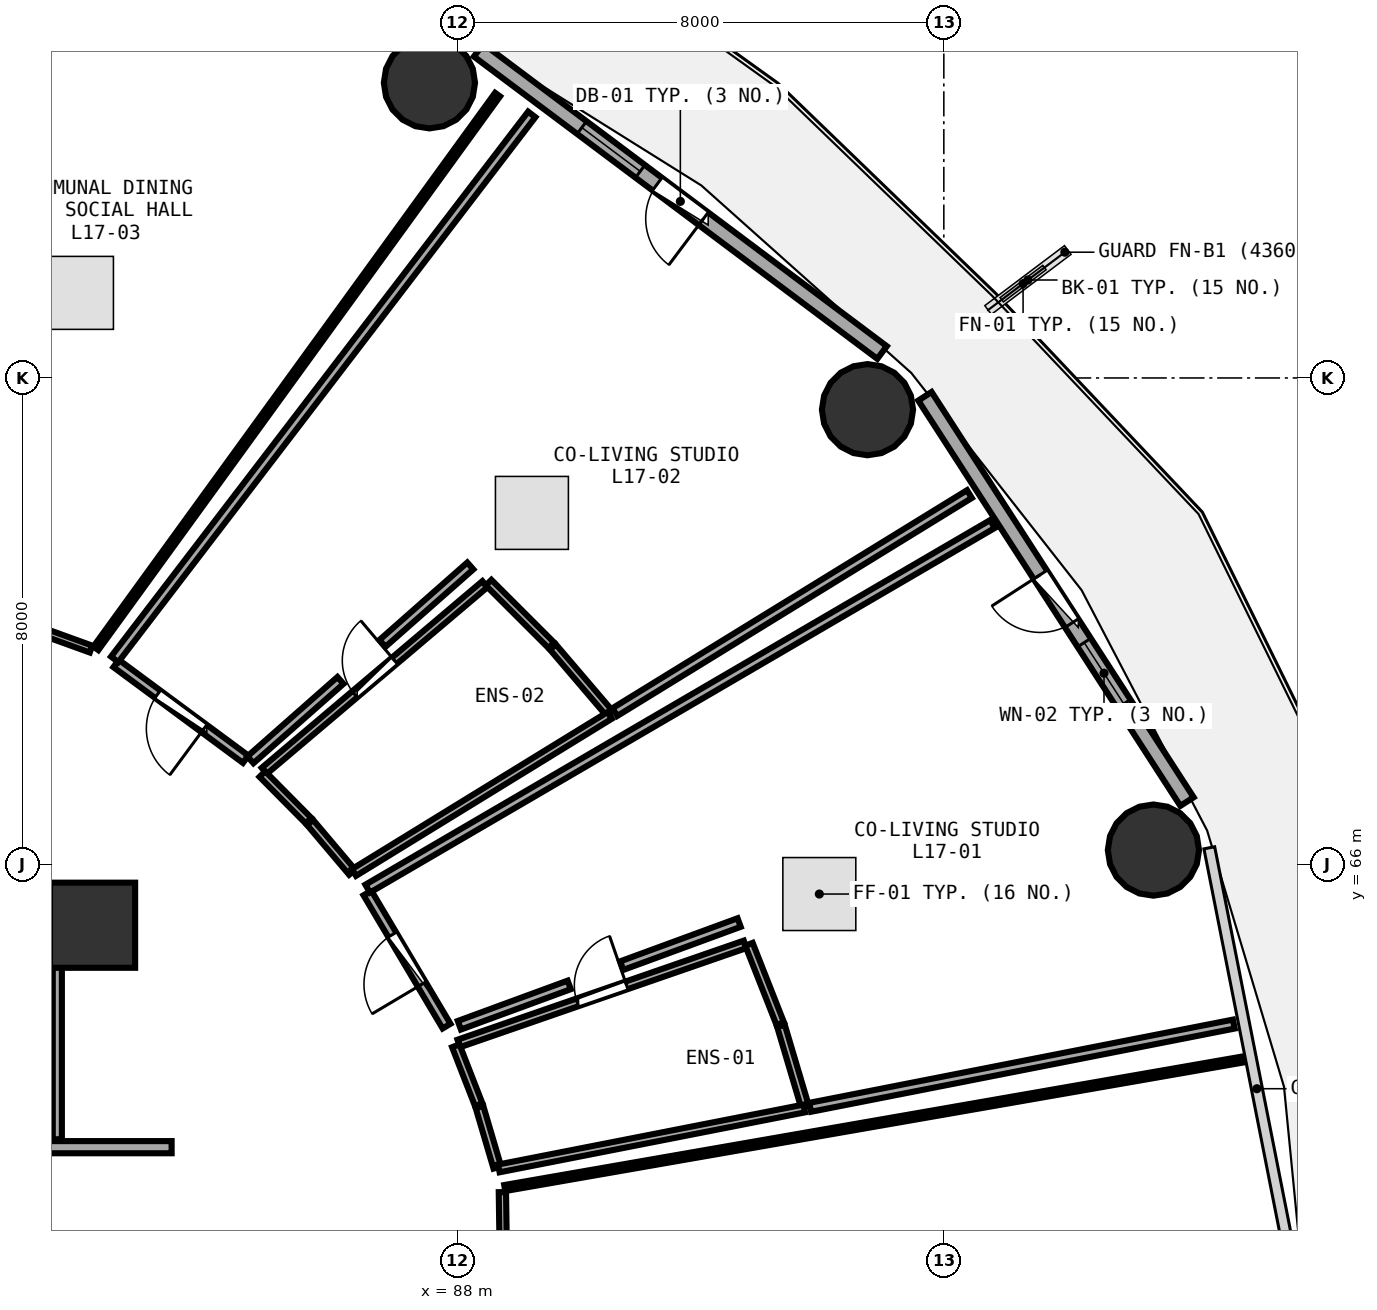
"""IFC4 building model, lengths in metres.
Left out: names, types, materials, properties, quantities, classifications, styles, units other than length and angle.
Written with IfcOpenShell. Run it as: python <this file> out.ifc"""

import sys

from ifc_helpers import new_model, si_unit, direction, frame, frame_2d, origin, origin_2d, place, context, subcontext, project, spatial, rectangle, circle, extrude, element, fill, save


model = new_model("IFC4")
c1 = context("Model", 3, precision=1e-05, world=origin(), true_north=direction((0.0, 1.0)))
c2 = subcontext(c1, "Body", "Model", "MODEL_VIEW")
j1 = project(units=[si_unit("LENGTHUNIT", "METRE"), si_unit("PLANEANGLEUNIT", "RADIAN")], contexts=[c1])
p1 = place(None, origin())
s1 = spatial("IfcSite", under=j1, at=p1, CompositionType="ELEMENT")
p2 = place(p1, origin())
s2 = spatial("IfcBuilding", under=s1, at=p2, CompositionType="ELEMENT")
p3 = place(p2, frame((0.0, 0.0, 67.5)))
s3 = spatial("IfcBuildingStorey", under=s2, at=p3, CompositionType="ELEMENT", Elevation=67.5)
p4 = place(p3, frame((82.0, 65.0, 0.0), z_axis=(0.0, 0.0, 1.0), x_axis=(1.0, 0.0, 0.0)))
e1 = element("IfcColumn", 1, at=p4, inside=s3, PredefinedType="PILASTER", context=c2, shape_type="SweptSolid", body=[
    extrude(rectangle(XDim=1.4, YDim=1.4, at=origin_2d()), origin(), (0.0, 0.0, 1.0), 4.76),
])
for number, where, z_axis, x_axis in (
    (2, (99.447, 66.236, 0.0), (0.0, 0.0, 1.0), (1.0, 0.0, 0.0)),
    (3, (94.744, 73.478, 0.0), (0.0, 0.0, 1.0), (1.0, 0.0, 0.0)),
    (4, (87.54, 78.854, 0.0), (0.0, 0.0, 1.0), (1.0, 0.0, 0.0)),
):
    element("IfcColumn", number, at=place(p3, frame(where, z_axis=z_axis, x_axis=x_axis)), inside=s3, PredefinedType="COLUMN", context=c2, shape_type="SweptSolid", body=[
        extrude(circle(Radius=0.75, at=origin_2d()), origin(), (0.0, 0.0, 1.0), 4.76),
    ])
p5 = place(p3, frame((99.999, 67.033, 0.0), z_axis=(0.0, 0.0, 1.0), x_axis=(-0.543005114258, 0.839729388488, 0.0)))
e5 = element("IfcWall", 5, at=p5, inside=s3, PredefinedType="SOLIDWALL", context=c2, shape_type="SweptSolid", body=[
    extrude(rectangle(XDim=7.938, YDim=0.26, at=frame_2d((3.969, 0.0))), origin(), (0.0, 0.0, 1.0), 4.345),
])
p6 = place(p5, frame((3.494, 0.0, 0.0)))
e6 = element("IfcOpeningElement", 6, at=p6, cuts=e5, PredefinedType="OPENING", context=c2, shape_type="SweptSolid", body=[
    extrude(rectangle(XDim=0.95, YDim=2.1, at=frame_2d((0.475, 1.05))), frame((0.0, 0.14, 0.0), z_axis=(0.0, -1.0, 0.0), x_axis=(1.0, 0.0, 0.0)), (0.0, 0.0, 1.0), 0.28),
])
p7 = place(p5, frame((1.914, 0.0, 0.85)))
e7 = element("IfcOpeningElement", 7, at=p7, cuts=e5, PredefinedType="OPENING", context=c2, shape_type="SweptSolid", body=[
    extrude(rectangle(XDim=1.2, YDim=1.45, at=frame_2d((0.6, 0.725))), frame((0.0, 0.14, 0.0), z_axis=(0.0, -1.0, 0.0), x_axis=(1.0, 0.0, 0.0)), (0.0, 0.0, 1.0), 0.28),
])
p8 = place(p3, frame((94.984, 74.418, 0.0), z_axis=(0.0, 0.0, 1.0), x_axis=(-0.80030733173, 0.599590005569, 0.0)))
e8 = element("IfcWall", 8, at=p8, inside=s3, PredefinedType="SOLIDWALL", context=c2, shape_type="SweptSolid", body=[
    extrude(rectangle(XDim=8.291, YDim=0.26, at=frame_2d((4.145, 0.0))), origin(), (0.0, 0.0, 1.0), 4.345),
])
p9 = place(p8, frame((3.67, 0.0, 0.0)))
e9 = element("IfcOpeningElement", 9, at=p9, cuts=e8, PredefinedType="OPENING", context=c2, shape_type="SweptSolid", body=[
    extrude(rectangle(XDim=0.95, YDim=2.1, at=frame_2d((0.475, 1.05))), frame((0.0, 0.14, 0.0), z_axis=(0.0, -1.0, 0.0), x_axis=(1.0, 0.0, 0.0)), (0.0, 0.0, 1.0), 0.28),
])
p10 = place(p8, frame((4.97, 0.0, 0.85)))
e10 = element("IfcOpeningElement", 10, at=p10, cuts=e8, PredefinedType="OPENING", context=c2, shape_type="SweptSolid", body=[
    extrude(rectangle(XDim=1.2, YDim=1.45, at=frame_2d((0.6, 0.725))), frame((0.0, 0.14, 0.0), z_axis=(0.0, -1.0, 0.0), x_axis=(1.0, 0.0, 0.0)), (0.0, 0.0, 1.0), 0.28),
])
p11 = place(p3, frame((74.0, 64.6, 0.0), z_axis=(0.0, 0.0, 1.0), x_axis=(1.0, 0.0, 0.0)))
e11 = element("IfcWall", 11, at=p11, inside=s3, PredefinedType="SHEAR", context=c2, shape_type="SweptSolid", body=[
    extrude(rectangle(XDim=8.0, YDim=0.45, at=frame_2d((4.0, 0.0))), origin(), (0.0, 0.0, 1.0), 4.36),
])
p12 = place(p3, frame((79.3, 61.35, 0.0), z_axis=(0.0, 0.0, 1.0), x_axis=(1.0, 0.0, 0.0)))
e12 = element("IfcWall", 12, at=p12, inside=s3, PredefinedType="SOLIDWALL", context=c2, shape_type="SweptSolid", body=[
    extrude(rectangle(XDim=4.0, YDim=0.2, at=frame_2d((2.0, 0.0))), origin(), (0.0, 0.0, 1.0), 3.645),
])
p13 = place(p12, frame((0.45, 0.0, 0.0)))
e13 = element("IfcOpeningElement", 13, at=p13, cuts=e12, PredefinedType="OPENING", context=c2, shape_type="SweptSolid", body=[
    extrude(rectangle(XDim=1.2, YDim=2.15, at=frame_2d((0.6, 1.075))), frame((0.0, 0.11, 0.0), z_axis=(0.0, -1.0, 0.0), x_axis=(1.0, 0.0, 0.0)), (0.0, 0.0, 1.0), 0.22),
])
p14 = place(p3, frame((81.42, 61.48, 0.0), z_axis=(0.0, 0.0, 1.0), x_axis=(0.0, 1.0, 0.0)))
e14 = element("IfcWall", 14, at=p14, inside=s3, PredefinedType="PARTITIONING", context=c2, shape_type="SweptSolid", body=[
    extrude(rectangle(XDim=2.84, YDim=0.15, at=frame_2d((1.42, 0.0))), origin(), (0.0, 0.0, 1.0), 4.35),
])
p15 = place(p3, frame((88.023, 63.056, 0.0), z_axis=(0.0, 0.0, 1.0), x_axis=(0.945000053877, 0.327070173163, 0.0)))
e15 = element("IfcWall", 15, at=p15, inside=s3, PredefinedType="PLUMBINGWALL", context=c2, shape_type="SweptSolid", body=[
    extrude(rectangle(XDim=4.982, YDim=0.13, at=frame_2d((2.491, 0.0))), origin(), (0.0, 0.0, 1.0), 4.045),
])
p16 = place(p15, frame((2.061, 0.0, 0.0)))
e16 = element("IfcOpeningElement", 16, at=p16, cuts=e15, PredefinedType="OPENING", context=c2, shape_type="SweptSolid", body=[
    extrude(rectangle(XDim=0.86, YDim=2.05, at=frame_2d((0.43, 1.025))), frame((0.0, 0.075, 0.0), z_axis=(0.0, -1.0, 0.0), x_axis=(1.0, 0.0, 0.0)), (0.0, 0.0, 1.0), 0.15),
])
p17 = place(p3, frame((87.821, 63.341, 0.0), z_axis=(0.0, 0.0, 1.0), x_axis=(-0.510684908265, 0.859767948036, 0.0)))
e17 = element("IfcWall", 17, at=p17, inside=s3, PredefinedType="PARTITIONING", context=c2, shape_type="SweptSolid", body=[
    extrude(rectangle(XDim=2.547, YDim=0.15, at=frame_2d((1.273, 0.0))), origin(), (0.0, 0.0, 1.0), 2.345),
])
p18 = place(p17, frame((0.799, 0.0, 0.0)))
e18 = element("IfcOpeningElement", 18, at=p18, cuts=e17, PredefinedType="OPENING", context=c2, shape_type="SweptSolid", body=[
    extrude(rectangle(XDim=0.95, YDim=2.08, at=frame_2d((0.475, 1.04))), frame((0.0, 0.085, 0.0), z_axis=(0.0, -1.0, 0.0), x_axis=(1.0, 0.0, 0.0)), (0.0, 0.0, 1.0), 0.17),
])
p19 = place(p3, frame((84.824, 67.539, 0.0), z_axis=(0.0, 0.0, 1.0), x_axis=(0.763460304027, 0.645854754705, 0.0)))
e19 = element("IfcWall", 19, at=p19, inside=s3, PredefinedType="PLUMBINGWALL", context=c2, shape_type="SweptSolid", body=[
    extrude(rectangle(XDim=4.754, YDim=0.13, at=frame_2d((2.377, 0.0))), origin(), (0.0, 0.0, 1.0), 4.045),
])
p20 = place(p19, frame((1.947, 0.0, 0.0)))
e20 = element("IfcOpeningElement", 20, at=p20, cuts=e19, PredefinedType="OPENING", context=c2, shape_type="SweptSolid", body=[
    extrude(rectangle(XDim=0.86, YDim=2.05, at=frame_2d((0.43, 1.025))), frame((0.0, 0.075, 0.0), z_axis=(0.0, -1.0, 0.0), x_axis=(1.0, 0.0, 0.0)), (0.0, 0.0, 1.0), 0.15),
])
p21 = place(p3, frame((84.518, 67.73, 0.0), z_axis=(0.0, 0.0, 1.0), x_axis=(-0.804204870708, 0.594352190144, 0.0)))
e21 = element("IfcWall", 21, at=p21, inside=s3, PredefinedType="PARTITIONING", context=c2, shape_type="SweptSolid", body=[
    extrude(rectangle(XDim=2.649, YDim=0.15, at=frame_2d((1.324, 0.0))), origin(), (0.0, 0.0, 1.0), 2.345),
])
p22 = place(p21, frame((0.85, 0.0, 0.0)))
e22 = element("IfcOpeningElement", 22, at=p22, cuts=e21, PredefinedType="OPENING", context=c2, shape_type="SweptSolid", body=[
    extrude(rectangle(XDim=0.95, YDim=2.08, at=frame_2d((0.475, 1.04))), frame((0.0, 0.085, 0.0), z_axis=(0.0, -1.0, 0.0), x_axis=(1.0, 0.0, 0.0)), (0.0, 0.0, 1.0), 0.17),
])
p23 = place(p3, frame((81.975, 69.542, 0.0), z_axis=(0.0, 0.0, 1.0), x_axis=(-0.940384663849, 0.340112751891, 0.0)))
e23 = element("IfcWall", 23, at=p23, inside=s3, PredefinedType="PARTITIONING", context=c2, shape_type="SweptSolid", body=[
    extrude(rectangle(XDim=5.316, YDim=0.12, at=frame_2d((2.658, 0.0))), origin(), (0.0, 0.0, 1.0), 2.345),
])
p24 = place(p23, frame((2.208, 0.0, 0.0)))
e24 = element("IfcOpeningElement", 24, at=p24, cuts=e23, PredefinedType="OPENING", context=c2, shape_type="SweptSolid", body=[
    extrude(rectangle(XDim=0.9, YDim=2.08, at=frame_2d((0.45, 1.04))), frame((0.0, 0.07, 0.0), z_axis=(0.0, -1.0, 0.0), x_axis=(1.0, 0.0, 0.0)), (0.0, 0.0, 1.0), 0.14),
])
p25 = place(p3, frame((88.81, 55.74, 0.0), z_axis=(0.0, 0.0, 1.0), x_axis=(-0.014383034903, 0.999896558803, 0.0)))
e25 = element("IfcWall", 25, at=p25, inside=s3, PredefinedType="PARTITIONING", context=c2, shape_type="SweptSolid", body=[
    extrude(rectangle(XDim=4.872, YDim=0.12, at=frame_2d((2.436, 0.0))), origin(), (0.0, 0.0, 1.0), 2.345),
])
p26 = place(p25, frame((1.986, 0.0, 0.0)))
e26 = element("IfcOpeningElement", 26, at=p26, cuts=e25, PredefinedType="OPENING", context=c2, shape_type="SweptSolid", body=[
    extrude(rectangle(XDim=0.9, YDim=2.08, at=frame_2d((0.45, 1.04))), frame((0.0, 0.07, 0.0), z_axis=(0.0, -1.0, 0.0), x_axis=(1.0, 0.0, 0.0)), (0.0, 0.0, 1.0), 0.14),
])
p27 = place(p3, frame((88.656, 61.016, 0.0), z_axis=(0.0, 0.0, 1.0), x_axis=(-0.282370492218, 0.959305428487, 0.0)))
e27 = element("IfcWall", 27, at=p27, inside=s3, PredefinedType="PLUMBINGWALL", context=c2, shape_type="SweptSolid", body=[
    extrude(rectangle(XDim=1.036, YDim=0.13, at=frame_2d((0.518, 0.0))), origin(), (0.0, 0.0, 1.0), 4.35),
])
p28 = place(p3, frame((88.351, 62.048, 0.0), z_axis=(0.0, 0.0, 1.0), x_axis=(-0.362514197989, 0.931978248811, 0.0)))
e28 = element("IfcWall", 28, at=p28, inside=s3, PredefinedType="PLUMBINGWALL", context=c2, shape_type="SweptSolid", body=[
    extrude(rectangle(XDim=1.041, YDim=0.13, at=frame_2d((0.52, 0.0))), origin(), (0.0, 0.0, 1.0), 4.105),
])
p29 = place(p3, frame((92.795, 64.686, 0.0), z_axis=(0.0, 0.0, 1.0), x_axis=(0.366277671592, -0.930505597669, 0.0)))
e29 = element("IfcWall", 29, at=p29, inside=s3, PredefinedType="PLUMBINGWALL", context=c2, shape_type="SweptSolid", body=[
    extrude(rectangle(XDim=1.401, YDim=0.13, at=frame_2d((0.701, 0.0))), origin(), (0.0, 0.0, 1.0), 4.35),
])
p30 = place(p3, frame((93.322, 63.345, 0.0), z_axis=(0.0, 0.0, 1.0), x_axis=(0.284613387728, -0.958642383543, 0.0)))
e30 = element("IfcWall", 30, at=p30, inside=s3, PredefinedType="PLUMBINGWALL", context=c2, shape_type="SweptSolid", body=[
    extrude(rectangle(XDim=1.393, YDim=0.13, at=frame_2d((0.697, 0.0))), origin(), (0.0, 0.0, 1.0), 4.35),
])
p31 = place(p3, frame((93.704, 61.986, 0.0), z_axis=(0.0, 0.0, 1.0), x_axis=(-0.981295026007, -0.192509926844, 0.0)))
e31 = element("IfcWall", 31, at=p31, inside=s3, PredefinedType="PLUMBINGWALL", context=c2, shape_type="SweptSolid", body=[
    extrude(rectangle(XDim=5.118, YDim=0.13, at=frame_2d((2.559, 0.0))), origin(), (0.0, 0.0, 1.0), 4.045),
])
p32 = place(p3, frame((86.524, 65.602, 0.0), z_axis=(0.0, 0.0, 1.0), x_axis=(0.863734985538, 0.503946301462, 0.0)))
e32 = element("IfcWall", 32, at=p32, inside=s3, PredefinedType="PARTITIONING", context=c2, shape_type="SweptSolid", body=[
    extrude(rectangle(XDim=11.897, YDim=0.15, at=frame_2d((5.949, 0.0))), origin(), (0.0, 0.0, 1.0), 2.345),
])
p33 = place(p3, frame((100.769, 63.374, 0.0), z_axis=(0.0, 0.0, 1.0), x_axis=(-0.98124289703, -0.192775457535, 0.0)))
e33 = element("IfcWall", 33, at=p33, inside=s3, PredefinedType="PARTITIONING", context=c2, shape_type="SweptSolid", body=[
    extrude(rectangle(XDim=7.1, YDim=0.15, at=frame_2d((3.55, 0.0))), origin(), (0.0, 0.0, 1.0), 2.345),
])
p34 = place(p3, frame((92.634, 65.044, 0.0), z_axis=(0.0, 0.0, 1.0), x_axis=(-0.938773982481, -0.344533612028, 0.0)))
e34 = element("IfcWall", 34, at=p34, inside=s3, PredefinedType="PARTITIONING", context=c2, shape_type="SweptSolid", body=[
    extrude(rectangle(XDim=2.057, YDim=0.15, at=frame_2d((1.029, 0.0))), origin(), (0.0, 0.0, 1.0), 2.345),
])
p35 = place(p3, frame((89.839, 64.018, 0.0), z_axis=(0.0, 0.0, 1.0), x_axis=(-0.938736795894, -0.344634919931, 0.0)))
e35 = element("IfcWall", 35, at=p35, inside=s3, PredefinedType="PARTITIONING", context=c2, shape_type="SweptSolid", body=[
    extrude(rectangle(XDim=1.924, YDim=0.15, at=frame_2d((0.962, 0.0))), origin(), (0.0, 0.0, 1.0), 4.105),
])
p36 = place(p3, frame((86.269, 65.872, 0.0), z_axis=(0.0, 0.0, 1.0), x_axis=(-0.64568660148, 0.763602522697, 0.0)))
e36 = element("IfcWall", 36, at=p36, inside=s3, PredefinedType="PLUMBINGWALL", context=c2, shape_type="SweptSolid", body=[
    extrude(rectangle(XDim=1.07, YDim=0.13, at=frame_2d((0.535, 0.0))), origin(), (0.0, 0.0, 1.0), 4.35),
])
p37 = place(p3, frame((85.551, 66.719, 0.0), z_axis=(0.0, 0.0, 1.0), x_axis=(-0.703476009128, 0.710719005361, 0.0)))
e37 = element("IfcWall", 37, at=p37, inside=s3, PredefinedType="PLUMBINGWALL", context=c2, shape_type="SweptSolid", body=[
    extrude(rectangle(XDim=1.079, YDim=0.13, at=frame_2d((0.539, 0.0))), origin(), (0.0, 0.0, 1.0), 2.345),
])
p38 = place(p3, frame((88.513, 70.634, 0.0), z_axis=(0.0, 0.0, 1.0), x_axis=(0.707441823433, -0.706771580114, 0.0)))
e38 = element("IfcWall", 38, at=p38, inside=s3, PredefinedType="PLUMBINGWALL", context=c2, shape_type="SweptSolid", body=[
    extrude(rectangle(XDim=1.457, YDim=0.13, at=frame_2d((0.729, 0.0))), origin(), (0.0, 0.0, 1.0), 2.345),
])
p39 = place(p3, frame((89.571, 69.575, 0.0), z_axis=(0.0, 0.0, 1.0), x_axis=(0.649398300051, -0.76044845183, 0.0)))
e39 = element("IfcWall", 39, at=p39, inside=s3, PredefinedType="PLUMBINGWALL", context=c2, shape_type="SweptSolid", body=[
    extrude(rectangle(XDim=1.444, YDim=0.13, at=frame_2d((0.722, 0.0))), origin(), (0.0, 0.0, 1.0), 2.345),
])
p40 = place(p3, frame((90.505, 68.45, 0.0), z_axis=(0.0, 0.0, 1.0), x_axis=(-0.852126722184, -0.523335503611, 0.0)))
e40 = element("IfcWall", 40, at=p40, inside=s3, PredefinedType="PLUMBINGWALL", context=c2, shape_type="SweptSolid", body=[
    extrude(rectangle(XDim=4.936, YDim=0.13, at=frame_2d((2.468, 0.0))), origin(), (0.0, 0.0, 1.0), 4.045),
])
p41 = place(p3, frame((82.363, 69.372, 0.0), z_axis=(0.0, 0.0, 1.0), x_axis=(0.607772837178, 0.79411093582, 0.0)))
e41 = element("IfcWall", 41, at=p41, inside=s3, PredefinedType="PARTITIONING", context=c2, shape_type="SweptSolid", body=[
    extrude(rectangle(XDim=11.286, YDim=0.15, at=frame_2d((5.643, 0.0))), origin(), (0.0, 0.0, 1.0), 2.345),
])
p42 = place(p3, frame((96.421, 72.09, 0.0), z_axis=(0.0, 0.0, 1.0), x_axis=(-0.85189211047, -0.523717320813, 0.0)))
e42 = element("IfcWall", 42, at=p42, inside=s3, PredefinedType="PARTITIONING", context=c2, shape_type="SweptSolid", body=[
    extrude(rectangle(XDim=6.846, YDim=0.15, at=frame_2d((3.423, 0.0))), origin(), (0.0, 0.0, 1.0), 2.345),
])
p43 = place(p3, frame((88.212, 70.908, 0.0), z_axis=(0.0, 0.0, 1.0), x_axis=(-0.750129957485, -0.661290440641, 0.0)))
e43 = element("IfcWall", 43, at=p43, inside=s3, PredefinedType="PARTITIONING", context=c2, shape_type="SweptSolid", body=[
    extrude(rectangle(XDim=1.927, YDim=0.15, at=frame_2d((0.963, 0.0))), origin(), (0.0, 0.0, 1.0), 4.045),
])
p44 = place(p3, frame((86.077, 69.026, 0.0), z_axis=(0.0, 0.0, 1.0), x_axis=(-0.75011209805, -0.661310698809, 0.0)))
e44 = element("IfcWall", 44, at=p44, inside=s3, PredefinedType="PARTITIONING", context=c2, shape_type="SweptSolid", body=[
    extrude(rectangle(XDim=1.974, YDim=0.15, at=frame_2d((0.987, 0.0))), origin(), (0.0, 0.0, 1.0), 4.105),
])
p45 = place(p3, frame((88.66, 78.66, 0.0), z_axis=(0.0, 0.0, 1.0), x_axis=(-0.587198342421, -0.809443084261, 0.0)))
e45 = element("IfcWall", 45, at=p45, inside=s3, PredefinedType="PARTITIONING", context=c2, shape_type="SweptSolid", body=[
    extrude(rectangle(XDim=11.25, YDim=0.1, at=frame_2d((5.625, 0.0))), origin(), (0.0, 0.0, 1.0), 2.345),
])
p46 = place(p3, frame((88.778, 60.678, 0.0), z_axis=(0.0, 0.0, 1.0), x_axis=(0.985176076522, 0.171546198583, 0.0)))
e46 = element("IfcWall", 46, at=p46, inside=s3, PredefinedType="PARTITIONING", context=c2, shape_type="SweptSolid", body=[
    extrude(rectangle(XDim=12.312, YDim=0.1, at=frame_2d((6.156, 0.0))), origin(), (0.0, 0.0, 1.0), 2.345),
])
p47 = place(p6, frame((0.95, 0.0, 0.0), z_axis=(0.0, 0.0, 1.0), x_axis=(-1.0, 0.0, 0.0)))
e47 = element("IfcDoor", 47, at=p47, inside=s3, OperationType="SINGLE_SWING_LEFT", PredefinedType="DOOR", context=c2, shape_type="SweptSolid", body=[
    extrude(rectangle(XDim=0.95, YDim=2.1, at=frame_2d((0.475, 1.05))), frame((0.0, 0.025, 0.0), z_axis=(0.0, -1.0, 0.0), x_axis=(1.0, 0.0, 0.0)), (0.0, 0.0, 1.0), 0.05),
])
fill(e6, e47)
p48 = place(p7, origin())
e48 = element("IfcWindow", 48, at=p48, inside=s3, PartitioningType="SINGLE_PANEL", PredefinedType="WINDOW", context=c2, shape_type="SweptSolid", body=[
    extrude(rectangle(XDim=1.2, YDim=1.45, at=frame_2d((0.6, 0.725))), frame((0.0, 0.03, 0.0), z_axis=(0.0, -1.0, 0.0), x_axis=(1.0, 0.0, 0.0)), (0.0, 0.0, 1.0), 0.06),
])
fill(e7, e48)
p49 = place(p9, frame((0.95, 0.0, 0.0), z_axis=(0.0, 0.0, 1.0), x_axis=(-1.0, 0.0, 0.0)))
e49 = element("IfcDoor", 49, at=p49, inside=s3, OperationType="SINGLE_SWING_RIGHT", PredefinedType="DOOR", context=c2, shape_type="SweptSolid", body=[
    extrude(rectangle(XDim=0.95, YDim=2.1, at=frame_2d((0.475, 1.05))), frame((0.0, 0.025, 0.0), z_axis=(0.0, -1.0, 0.0), x_axis=(1.0, 0.0, 0.0)), (0.0, 0.0, 1.0), 0.05),
])
fill(e9, e49)
p50 = place(p10, origin())
e50 = element("IfcWindow", 50, at=p50, inside=s3, PartitioningType="SINGLE_PANEL", PredefinedType="WINDOW", context=c2, shape_type="SweptSolid", body=[
    extrude(rectangle(XDim=1.2, YDim=1.45, at=frame_2d((0.6, 0.725))), frame((0.0, 0.03, 0.0), z_axis=(0.0, -1.0, 0.0), x_axis=(1.0, 0.0, 0.0)), (0.0, 0.0, 1.0), 0.06),
])
fill(e10, e50)
p51 = place(p16, origin())
e51 = element("IfcDoor", 51, at=p51, inside=s3, OperationType="SINGLE_SWING_RIGHT", PredefinedType="DOOR", context=c2, shape_type="SweptSolid", body=[
    extrude(rectangle(XDim=0.86, YDim=2.05, at=frame_2d((0.43, 1.025))), frame((0.0, 0.025, 0.0), z_axis=(0.0, -1.0, 0.0), x_axis=(1.0, 0.0, 0.0)), (0.0, 0.0, 1.0), 0.05),
])
fill(e16, e51)
p52 = place(p18, origin())
e52 = element("IfcDoor", 52, at=p52, inside=s3, OperationType="SINGLE_SWING_LEFT", PredefinedType="DOOR", context=c2, shape_type="SweptSolid", body=[
    extrude(rectangle(XDim=0.95, YDim=2.08, at=frame_2d((0.475, 1.04))), frame((0.0, 0.025, 0.0), z_axis=(0.0, -1.0, 0.0), x_axis=(1.0, 0.0, 0.0)), (0.0, 0.0, 1.0), 0.05),
])
fill(e18, e52)
p53 = place(p20, origin())
e53 = element("IfcDoor", 53, at=p53, inside=s3, OperationType="SINGLE_SWING_RIGHT", PredefinedType="DOOR", context=c2, shape_type="SweptSolid", body=[
    extrude(rectangle(XDim=0.86, YDim=2.05, at=frame_2d((0.43, 1.025))), frame((0.0, 0.025, 0.0), z_axis=(0.0, -1.0, 0.0), x_axis=(1.0, 0.0, 0.0)), (0.0, 0.0, 1.0), 0.05),
])
fill(e20, e53)
p54 = place(p22, origin())
e54 = element("IfcDoor", 54, at=p54, inside=s3, OperationType="SINGLE_SWING_LEFT", PredefinedType="DOOR", context=c2, shape_type="SweptSolid", body=[
    extrude(rectangle(XDim=0.95, YDim=2.08, at=frame_2d((0.475, 1.04))), frame((0.0, 0.025, 0.0), z_axis=(0.0, -1.0, 0.0), x_axis=(1.0, 0.0, 0.0)), (0.0, 0.0, 1.0), 0.05),
])
fill(e22, e54)
save(model, sys.argv[1])
